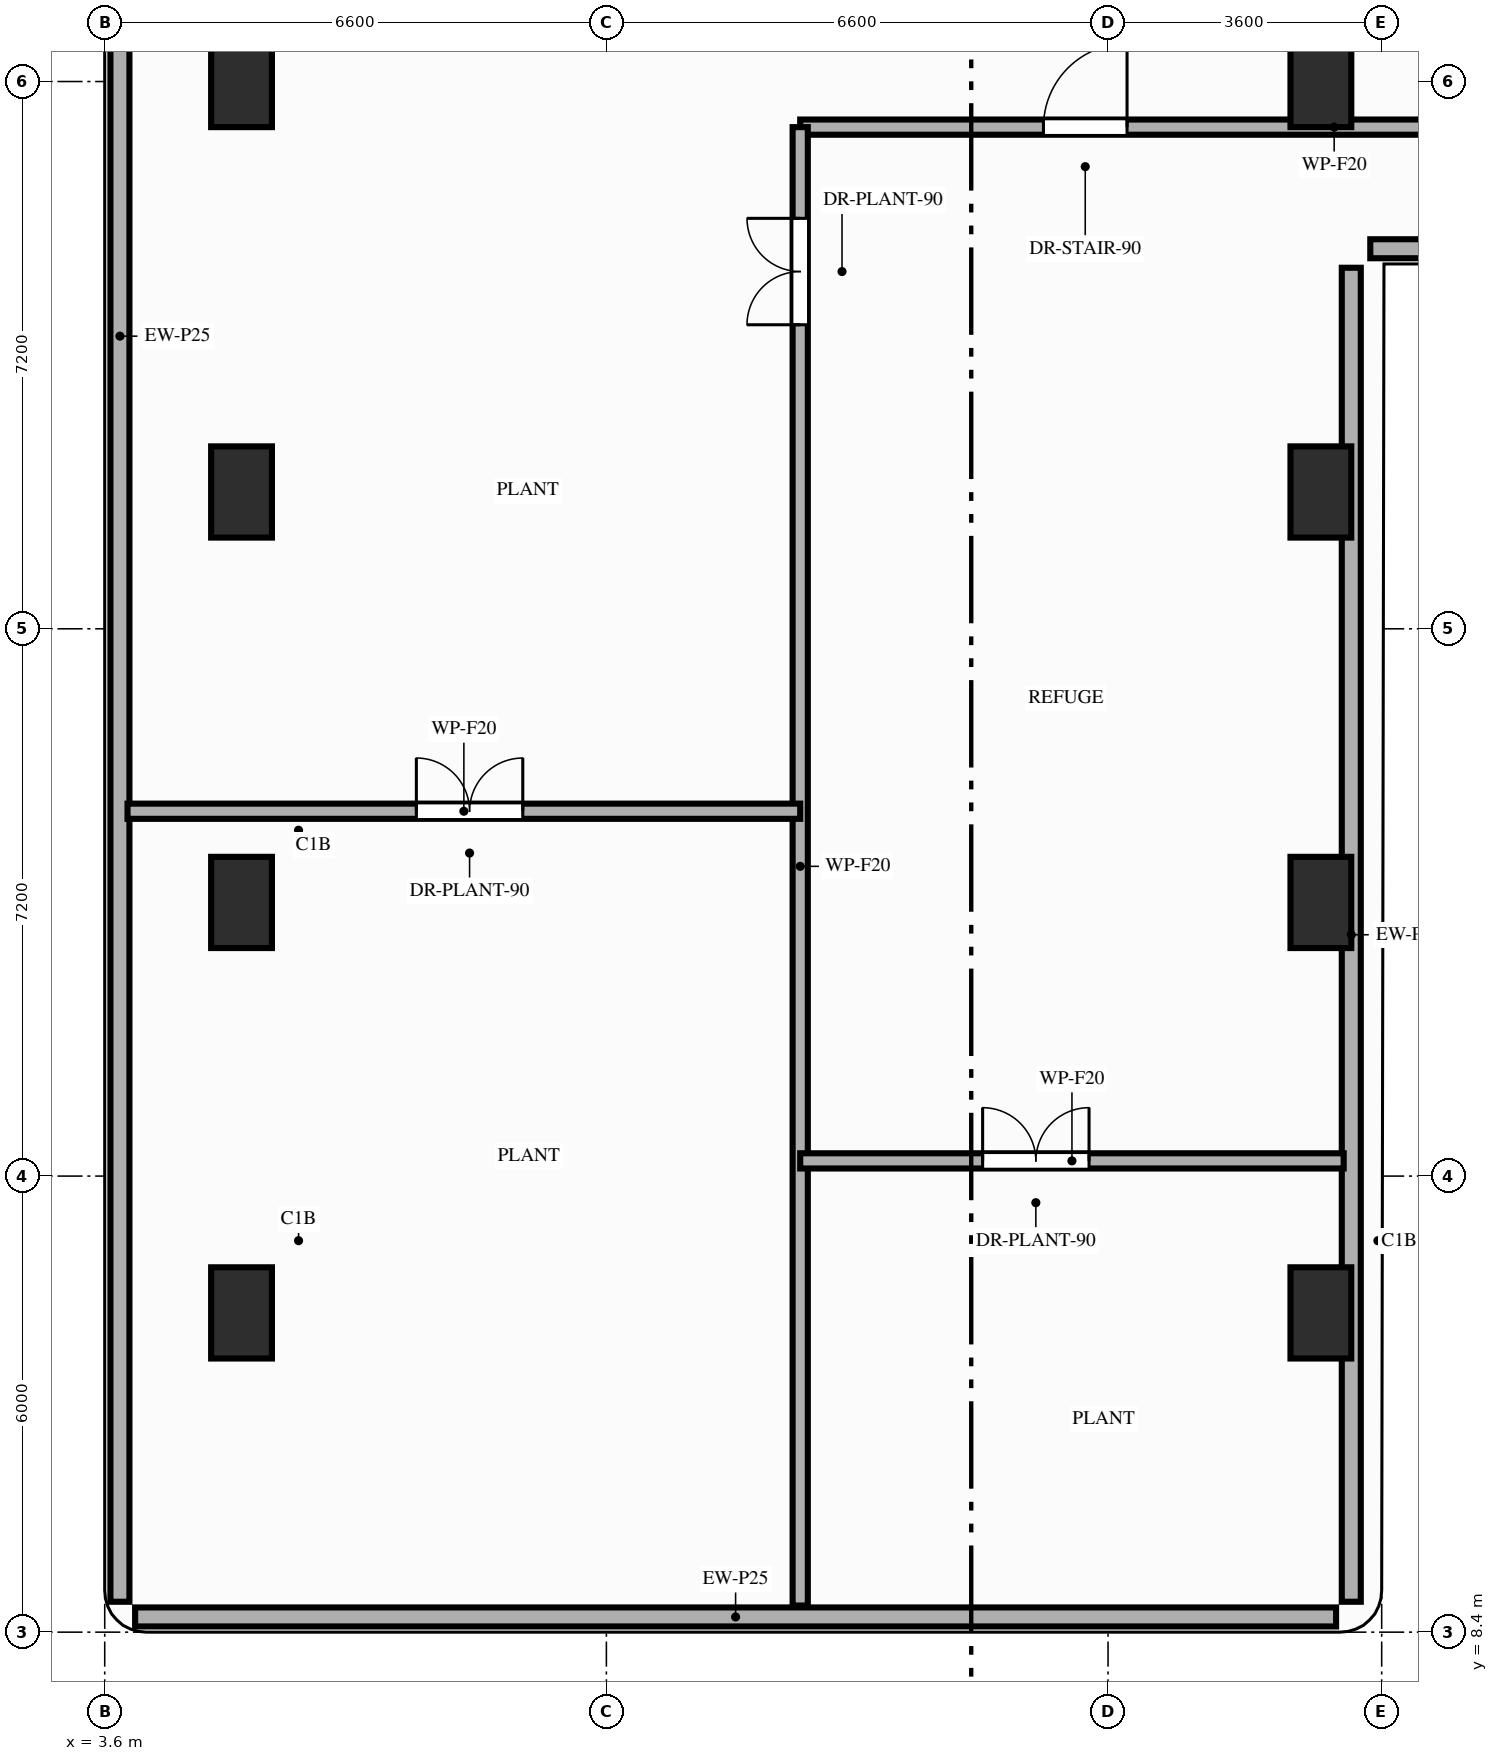
"""IFC4 building model, lengths in metres.
Left out: names, types, materials, properties, quantities, classifications, styles, units other than length and angle.
Written with IfcOpenShell. Run it as: python <this file> out.ifc"""

import sys

from ifc_helpers import new_model, si_unit, direction, frame, frame_2d, origin, origin_2d, place, context, subcontext, project, spatial, rectangle, extrude, element, fill, save


model = new_model("IFC4")
c1 = context("Model", 3, precision=1e-05, world=origin(), true_north=direction((0.0, 1.0)))
c2 = subcontext(c1, "Body", "Model", "MODEL_VIEW")
j1 = project(units=[si_unit("LENGTHUNIT", "METRE"), si_unit("PLANEANGLEUNIT", "RADIAN")], contexts=[c1])
p1 = place(None, origin())
s1 = spatial("IfcSite", under=j1, at=p1, CompositionType="ELEMENT")
p2 = place(p1, origin())
s2 = spatial("IfcBuilding", under=s1, at=p2, CompositionType="ELEMENT")
p3 = place(p2, frame((0.0, 0.0, 79.4)))
s3 = spatial("IfcBuildingStorey", under=s2, at=p3, CompositionType="ELEMENT", Elevation=79.4)
for number, where, z_axis, x_axis in (
    (1, (5.4, 12.6, 0.0), (0.0, 0.0, 1.0), (1.0, 0.0, 0.0)),
    (2, (19.6, 12.6, 0.0), (0.0, 0.0, 1.0), (1.0, 0.0, 0.0)),
    (3, (5.4, 18.0, 0.0), (0.0, 0.0, 1.0), (1.0, 0.0, 0.0)),
    (4, (19.6, 18.0, 0.0), (0.0, 0.0, 1.0), (1.0, 0.0, 0.0)),
    (5, (5.4, 23.4, 0.0), (0.0, 0.0, 1.0), (1.0, 0.0, 0.0)),
    (6, (19.6, 23.4, 0.0), (0.0, 0.0, 1.0), (1.0, 0.0, 0.0)),
    (7, (5.4, 28.8, 0.0), (0.0, 0.0, 1.0), (1.0, 0.0, 0.0)),
    (8, (19.6, 28.8, 0.0), (0.0, 0.0, 1.0), (1.0, 0.0, 0.0)),
):
    element("IfcColumn", number, at=place(p3, frame(where, z_axis=z_axis, x_axis=x_axis)), inside=s3, PredefinedType="COLUMN", context=c2, shape_type="SweptSolid", body=[
        extrude(rectangle(XDim=0.8, YDim=1.2, at=origin_2d()), origin(), (0.0, 0.0, 1.0), 4.0),
    ])
p4 = place(p3, frame((4.0, 8.6, 0.0), z_axis=(0.0, 0.0, 1.0), x_axis=(1.0, 0.0, 0.0)))
e9 = element("IfcWall", 9, at=p4, inside=s3, PredefinedType="STANDARD", context=c2, shape_type="SweptSolid", body=[
    extrude(rectangle(XDim=15.8, YDim=0.25, at=frame_2d((7.9, 0.0))), origin(), (0.0, 0.0, 1.0), 3.82),
])
p5 = place(p3, frame((3.8, 42.1, 0.0), z_axis=(0.0, 0.0, 1.0), x_axis=(0.0, -1.0, 0.0)))
e10 = element("IfcWall", 10, at=p5, inside=s3, PredefinedType="STANDARD", context=c2, shape_type="SweptSolid", body=[
    extrude(rectangle(XDim=33.3, YDim=0.25, at=frame_2d((16.65, 0.0))), origin(), (0.0, 0.0, 1.0), 3.51),
])
p6 = place(p3, frame((20.0, 8.8, 0.0), z_axis=(0.0, 0.0, 1.0), x_axis=(0.0, 1.0, 0.0)))
e11 = element("IfcWall", 11, at=p6, inside=s3, PredefinedType="STANDARD", context=c2, shape_type="SweptSolid", body=[
    extrude(rectangle(XDim=17.55, YDim=0.25, at=frame_2d((8.775, 0.0))), origin(), (0.0, 0.0, 1.0), 3.21),
])
p7 = place(p3, frame((20.25, 26.6, 0.0), z_axis=(0.0, 0.0, 1.0), x_axis=(1.0, 0.0, 0.0)))
e12 = element("IfcWall", 12, at=p7, inside=s3, PredefinedType="STANDARD", context=c2, shape_type="SweptSolid", body=[
    extrude(rectangle(XDim=26.15, YDim=0.25, at=frame_2d((13.075, 0.0))), origin(), (0.0, 0.0, 1.0), 3.51),
])
p8 = place(p3, frame((12.75, 28.2, 0.0), z_axis=(0.0, 0.0, 1.0), x_axis=(1.0, 0.0, 0.0)))
e13 = element("IfcWall", 13, at=p8, inside=s3, PredefinedType="PARTITIONING", context=c2, shape_type="SweptSolid", body=[
    extrude(rectangle(XDim=14.05, YDim=0.2, at=frame_2d((7.025, 0.0))), origin(), (0.0, 0.0, 1.0), 3.21),
])
p9 = place(p8, frame((3.2, 0.0, 0.0)))
e14 = element("IfcOpeningElement", 14, at=p9, cuts=e13, PredefinedType="OPENING", context=c2, shape_type="SweptSolid", body=[
    extrude(rectangle(XDim=1.1, YDim=2.15, at=frame_2d((0.55, 1.075))), frame((0.0, 0.11, 0.0), z_axis=(0.0, -1.0, 0.0), x_axis=(1.0, 0.0, 0.0)), (0.0, 0.0, 1.0), 0.22),
])
p10 = place(p3, frame((12.75, 8.75, 0.0), z_axis=(0.0, 0.0, 1.0), x_axis=(0.0, 1.0, 0.0)))
e15 = element("IfcWall", 15, at=p10, inside=s3, PredefinedType="PARTITIONING", context=c2, shape_type="SweptSolid", body=[
    extrude(rectangle(XDim=19.45, YDim=0.2, at=frame_2d((9.725, 0.0))), origin(), (0.0, 0.0, 1.0), 3.21),
])
p11 = place(p10, frame((16.85, 0.0, 0.0)))
e16 = element("IfcOpeningElement", 16, at=p11, cuts=e15, PredefinedType="OPENING", context=c2, shape_type="SweptSolid", body=[
    extrude(rectangle(XDim=1.4, YDim=2.2, at=frame_2d((0.7, 1.1))), frame((0.0, 0.11, 0.0), z_axis=(0.0, -1.0, 0.0), x_axis=(1.0, 0.0, 0.0)), (0.0, 0.0, 1.0), 0.22),
])
p12 = place(p3, frame((12.75, 14.6, 0.0), z_axis=(0.0, 0.0, 1.0), x_axis=(1.0, 0.0, 0.0)))
e17 = element("IfcWall", 17, at=p12, inside=s3, PredefinedType="PARTITIONING", context=c2, shape_type="SweptSolid", body=[
    extrude(rectangle(XDim=7.15, YDim=0.2, at=frame_2d((3.575, 0.0))), origin(), (0.0, 0.0, 1.0), 3.21),
])
p13 = place(p12, frame((2.4, 0.0, 0.0)))
e18 = element("IfcOpeningElement", 18, at=p13, cuts=e17, PredefinedType="OPENING", context=c2, shape_type="SweptSolid", body=[
    extrude(rectangle(XDim=1.4, YDim=2.2, at=frame_2d((0.7, 1.1))), frame((0.0, 0.11, 0.0), z_axis=(0.0, -1.0, 0.0), x_axis=(1.0, 0.0, 0.0)), (0.0, 0.0, 1.0), 0.22),
])
p14 = place(p3, frame((3.9, 19.2, 0.0), z_axis=(0.0, 0.0, 1.0), x_axis=(1.0, 0.0, 0.0)))
e19 = element("IfcWall", 19, at=p14, inside=s3, PredefinedType="PARTITIONING", context=c2, shape_type="SweptSolid", body=[
    extrude(rectangle(XDim=8.85, YDim=0.2, at=frame_2d((4.425, 0.0))), origin(), (0.0, 0.0, 1.0), 3.21),
])
p15 = place(p14, frame((3.8, 0.0, 0.0)))
e20 = element("IfcOpeningElement", 20, at=p15, cuts=e19, PredefinedType="OPENING", context=c2, shape_type="SweptSolid", body=[
    extrude(rectangle(XDim=1.4, YDim=2.2, at=frame_2d((0.7, 1.1))), frame((0.0, 0.11, 0.0), z_axis=(0.0, -1.0, 0.0), x_axis=(1.0, 0.0, 0.0)), (0.0, 0.0, 1.0), 0.22),
])
p16 = place(p9, origin())
e21 = element("IfcDoor", 21, at=p16, inside=s3, OperationType="SINGLE_SWING_RIGHT", PredefinedType="DOOR", context=c2, shape_type="SweptSolid", body=[
    extrude(rectangle(XDim=1.1, YDim=2.15, at=frame_2d((0.55, 1.075))), frame((0.0, 0.025, 0.0), z_axis=(0.0, -1.0, 0.0), x_axis=(1.0, 0.0, 0.0)), (0.0, 0.0, 1.0), 0.05),
])
fill(e14, e21)
p17 = place(p11, origin())
e22 = element("IfcDoor", 22, at=p17, inside=s3, OperationType="DOUBLE_DOOR_SINGLE_SWING", PredefinedType="DOOR", context=c2, shape_type="SweptSolid", body=[
    extrude(rectangle(XDim=1.4, YDim=2.2, at=frame_2d((0.7, 1.1))), frame((0.0, 0.025, 0.0), z_axis=(0.0, -1.0, 0.0), x_axis=(1.0, 0.0, 0.0)), (0.0, 0.0, 1.0), 0.05),
])
fill(e16, e22)
p18 = place(p15, origin())
e23 = element("IfcDoor", 23, at=p18, inside=s3, OperationType="DOUBLE_DOOR_SINGLE_SWING", PredefinedType="DOOR", context=c2, shape_type="SweptSolid", body=[
    extrude(rectangle(XDim=1.4, YDim=2.2, at=frame_2d((0.7, 1.1))), frame((0.0, 0.025, 0.0), z_axis=(0.0, -1.0, 0.0), x_axis=(1.0, 0.0, 0.0)), (0.0, 0.0, 1.0), 0.05),
])
fill(e20, e23)
p19 = place(p13, origin())
e24 = element("IfcDoor", 24, at=p19, inside=s3, OperationType="DOUBLE_DOOR_SINGLE_SWING", PredefinedType="DOOR", context=c2, shape_type="SweptSolid", body=[
    extrude(rectangle(XDim=1.4, YDim=2.2, at=frame_2d((0.7, 1.1))), frame((0.0, 0.025, 0.0), z_axis=(0.0, -1.0, 0.0), x_axis=(1.0, 0.0, 0.0)), (0.0, 0.0, 1.0), 0.05),
])
fill(e18, e24)
save(model, sys.argv[1])
